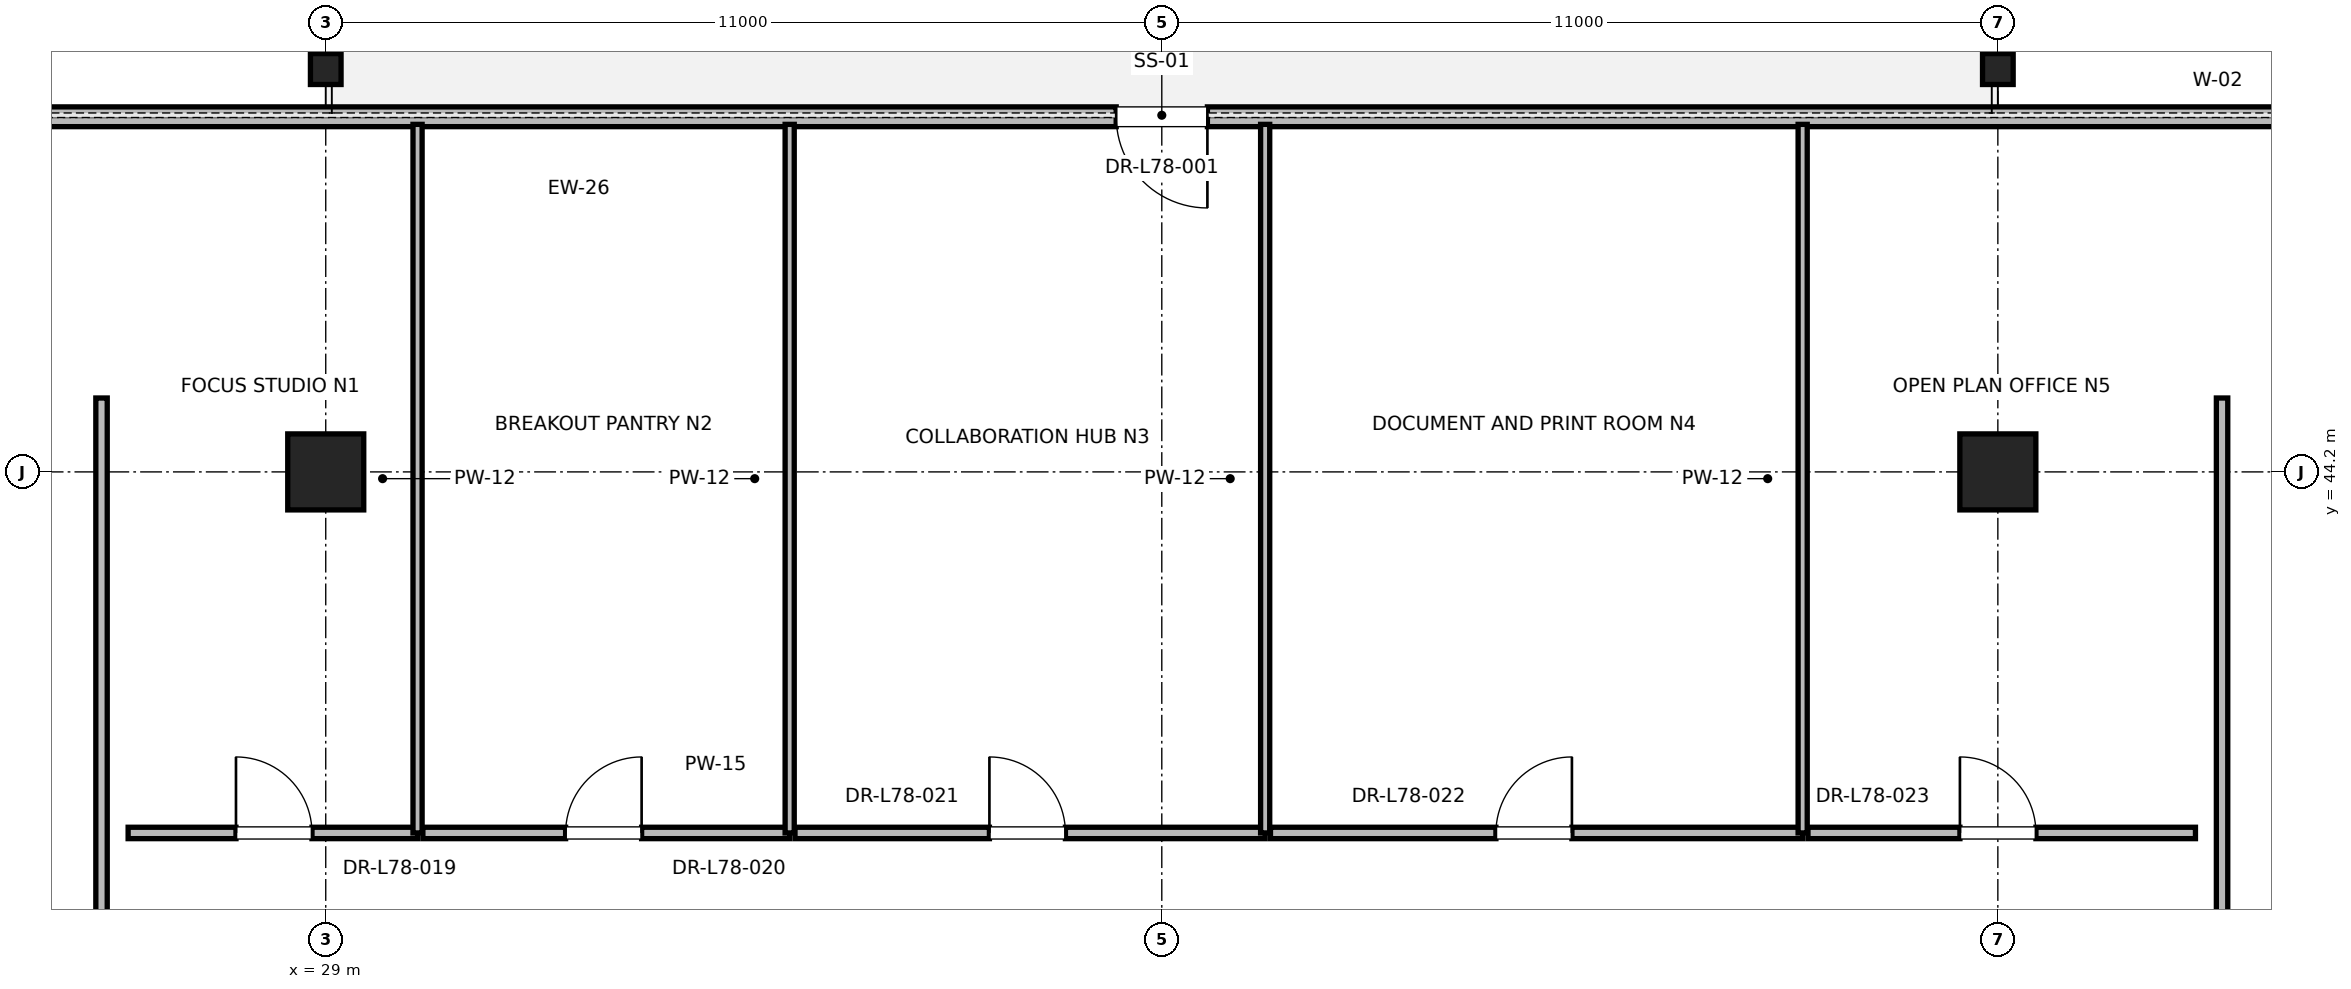
"""IFC4 building model, lengths in metres.
Left out: names, types, materials, properties, quantities, classifications, styles, units other than length and angle.
Written with IfcOpenShell. Run it as: python <this file> out.ifc"""

import sys

from ifc_helpers import new_model, si_unit, direction, frame, frame_2d, origin, origin_2d, place, context, subcontext, project, spatial, rectangle, i_section, extrude, element, fill, save


model = new_model("IFC4")
c1 = context("Model", 3, precision=1e-05, world=origin(), true_north=direction((0.0, 1.0)))
c2 = subcontext(c1, "Body", "Model", "MODEL_VIEW")
j1 = project(units=[si_unit("LENGTHUNIT", "METRE"), si_unit("PLANEANGLEUNIT", "RADIAN")], contexts=[c1])
p1 = place(None, origin())
s1 = spatial("IfcSite", under=j1, at=p1, CompositionType="ELEMENT")
p2 = place(p1, origin())
s2 = spatial("IfcBuilding", under=s1, at=p2, CompositionType="ELEMENT")
p3 = place(p2, frame((0.0, 0.0, 334.8)))
s3 = spatial("IfcBuildingStorey", under=s2, at=p3, CompositionType="ELEMENT", Elevation=334.8)
for number, where, z_axis, x_axis in (
    (1, (29.0, 44.2, 0.0), (0.0, 0.0, 1.0), (1.0, 0.0, 0.0)),
    (2, (51.0, 44.2, 0.0), (0.0, 0.0, 1.0), (1.0, 0.0, 0.0)),
):
    element("IfcColumn", number, at=place(p3, frame(where, z_axis=z_axis, x_axis=x_axis)), inside=s3, PredefinedType="COLUMN", context=c2, shape_type="SweptSolid", body=[
        extrude(rectangle(XDim=1.0, YDim=1.0, at=origin_2d()), origin(), (0.0, 0.0, 1.0), 4.0),
    ])
for number, where, z_axis, x_axis in (
    (3, (29.0, 49.5, 0.0), (0.0, 0.0, 1.0), (1.0, 0.0, 0.0)),
    (4, (51.0, 49.5, 0.0), (0.0, 0.0, 1.0), (1.0, 0.0, 0.0)),
):
    element("IfcColumn", number, at=place(p3, frame(where, z_axis=z_axis, x_axis=x_axis)), inside=s3, PredefinedType="COLUMN", context=c2, shape_type="SweptSolid", body=[
        extrude(i_section(OverallWidth=0.403, OverallDepth=0.406, WebThickness=0.027, FlangeThickness=0.043, FilletRadius=0.015, at=origin_2d()), origin(), (0.0, 0.0, 1.0), 4.0),
    ])
p4 = place(p3, frame((60.544, 48.872, 0.0), z_axis=(0.0, 0.0, 1.0), x_axis=(-1.0, 0.0, 0.0)))
e5 = element("IfcWall", 5, at=p4, inside=s3, PredefinedType="PARAPET", context=c2, shape_type="SweptSolid", body=[
    extrude(rectangle(XDim=41.089, YDim=0.26, at=frame_2d((20.544, 0.0))), origin(), (0.0, 0.0, 1.0), 3.196),
])
p5 = place(p4, frame((4.2, 0.0, 0.85)))
e6 = element("IfcOpeningElement", 6, at=p5, cuts=e5, PredefinedType="OPENING", context=c2, shape_type="SweptSolid", body=[
    extrude(rectangle(XDim=1.6, YDim=2.1, at=frame_2d((0.8, 1.05))), frame((0.0, 0.13, 0.0), z_axis=(0.0, -1.0, 0.0), x_axis=(1.0, 0.0, 0.0)), (0.0, 0.0, 1.0), 0.26),
])
p6 = place(p4, frame((19.944, 0.0, 0.0)))
e7 = element("IfcOpeningElement", 7, at=p6, cuts=e5, PredefinedType="OPENING", context=c2, shape_type="SweptSolid", body=[
    extrude(rectangle(XDim=1.2, YDim=2.2, at=frame_2d((0.6, 1.1))), frame((0.0, 0.13, 0.0), z_axis=(0.0, -1.0, 0.0), x_axis=(1.0, 0.0, 0.0)), (0.0, 0.0, 1.0), 0.26),
])
p7 = place(p4, frame((35.289, 0.0, 0.85)))
e8 = element("IfcOpeningElement", 8, at=p7, cuts=e5, PredefinedType="OPENING", context=c2, shape_type="SweptSolid", body=[
    extrude(rectangle(XDim=1.6, YDim=2.1, at=frame_2d((0.8, 1.05))), frame((0.0, 0.13, 0.0), z_axis=(0.0, -1.0, 0.0), x_axis=(1.0, 0.0, 0.0)), (0.0, 0.0, 1.0), 0.26),
])
p8 = place(p3, frame((26.4, 39.45, 0.0), z_axis=(0.0, 0.0, 1.0), x_axis=(1.0, 0.0, 0.0)))
e9 = element("IfcWall", 9, at=p8, inside=s3, PredefinedType="PARTITIONING", context=c2, shape_type="SweptSolid", body=[
    extrude(rectangle(XDim=3.808, YDim=0.15, at=frame_2d((1.904, 0.0))), origin(), (0.0, 0.0, 1.0), 2.85),
])
p9 = place(p8, frame((1.419, 0.0, 0.0)))
e10 = element("IfcOpeningElement", 10, at=p9, cuts=e9, PredefinedType="OPENING", context=c2, shape_type="SweptSolid", body=[
    extrude(rectangle(XDim=1.0, YDim=2.15, at=frame_2d((0.5, 1.075))), frame((0.0, 0.075, 0.0), z_axis=(0.0, -1.0, 0.0), x_axis=(1.0, 0.0, 0.0)), (0.0, 0.0, 1.0), 0.15),
])
p10 = place(p3, frame((30.208, 39.45, 0.0), z_axis=(0.0, 0.0, 1.0), x_axis=(0.0, 1.0, 0.0)))
e11 = element("IfcWall", 11, at=p10, inside=s3, PredefinedType="PARTITIONING", context=c2, shape_type="SweptSolid", body=[
    extrude(rectangle(XDim=9.322, YDim=0.12, at=frame_2d((4.661, 0.0))), origin(), (0.0, 0.0, 1.0), 2.415),
])
p11 = place(p3, frame((30.278, 39.45, 0.0), z_axis=(0.0, 0.0, 1.0), x_axis=(1.0, 0.0, 0.0)))
e12 = element("IfcWall", 12, at=p11, inside=s3, PredefinedType="PARTITIONING", context=c2, shape_type="SweptSolid", body=[
    extrude(rectangle(XDim=4.826, YDim=0.15, at=frame_2d((2.413, 0.0))), origin(), (0.0, 0.0, 1.0), 2.85),
])
p12 = place(p11, frame((1.878, 0.0, 0.0)))
e13 = element("IfcOpeningElement", 13, at=p12, cuts=e12, PredefinedType="OPENING", context=c2, shape_type="SweptSolid", body=[
    extrude(rectangle(XDim=1.0, YDim=2.15, at=frame_2d((0.5, 1.075))), frame((0.0, 0.075, 0.0), z_axis=(0.0, -1.0, 0.0), x_axis=(1.0, 0.0, 0.0)), (0.0, 0.0, 1.0), 0.15),
])
p13 = place(p3, frame((35.104, 39.45, 0.0), z_axis=(0.0, 0.0, 1.0), x_axis=(0.0, 1.0, 0.0)))
e14 = element("IfcWall", 14, at=p13, inside=s3, PredefinedType="PARTITIONING", context=c2, shape_type="SweptSolid", body=[
    extrude(rectangle(XDim=9.322, YDim=0.12, at=frame_2d((4.661, 0.0))), origin(), (0.0, 0.0, 1.0), 2.415),
])
p14 = place(p3, frame((35.174, 39.45, 0.0), z_axis=(0.0, 0.0, 1.0), x_axis=(1.0, 0.0, 0.0)))
e15 = element("IfcWall", 15, at=p14, inside=s3, PredefinedType="PARTITIONING", context=c2, shape_type="SweptSolid", body=[
    extrude(rectangle(XDim=6.186, YDim=0.15, at=frame_2d((3.093, 0.0))), origin(), (0.0, 0.0, 1.0), 2.85),
])
p15 = place(p14, frame((2.558, 0.0, 0.0)))
e16 = element("IfcOpeningElement", 16, at=p15, cuts=e15, PredefinedType="OPENING", context=c2, shape_type="SweptSolid", body=[
    extrude(rectangle(XDim=1.0, YDim=2.15, at=frame_2d((0.5, 1.075))), frame((0.0, 0.075, 0.0), z_axis=(0.0, -1.0, 0.0), x_axis=(1.0, 0.0, 0.0)), (0.0, 0.0, 1.0), 0.15),
])
p16 = place(p3, frame((41.36, 39.45, 0.0), z_axis=(0.0, 0.0, 1.0), x_axis=(0.0, 1.0, 0.0)))
e17 = element("IfcWall", 17, at=p16, inside=s3, PredefinedType="PARTITIONING", context=c2, shape_type="SweptSolid", body=[
    extrude(rectangle(XDim=9.322, YDim=0.12, at=frame_2d((4.661, 0.0))), origin(), (0.0, 0.0, 1.0), 2.415),
])
p17 = place(p3, frame((41.43, 39.45, 0.0), z_axis=(0.0, 0.0, 1.0), x_axis=(1.0, 0.0, 0.0)))
e18 = element("IfcWall", 18, at=p17, inside=s3, PredefinedType="PARTITIONING", context=c2, shape_type="SweptSolid", body=[
    extrude(rectangle(XDim=7.002, YDim=0.15, at=frame_2d((3.501, 0.0))), origin(), (0.0, 0.0, 1.0), 2.85),
])
p18 = place(p17, frame((2.966, 0.0, 0.0)))
e19 = element("IfcOpeningElement", 19, at=p18, cuts=e18, PredefinedType="OPENING", context=c2, shape_type="SweptSolid", body=[
    extrude(rectangle(XDim=1.0, YDim=2.15, at=frame_2d((0.5, 1.075))), frame((0.0, 0.075, 0.0), z_axis=(0.0, -1.0, 0.0), x_axis=(1.0, 0.0, 0.0)), (0.0, 0.0, 1.0), 0.15),
])
p19 = place(p3, frame((48.432, 39.45, 0.0), z_axis=(0.0, 0.0, 1.0), x_axis=(0.0, 1.0, 0.0)))
e20 = element("IfcWall", 20, at=p19, inside=s3, PredefinedType="PARTITIONING", context=c2, shape_type="SweptSolid", body=[
    extrude(rectangle(XDim=9.322, YDim=0.12, at=frame_2d((4.661, 0.0))), origin(), (0.0, 0.0, 1.0), 2.415),
])
p20 = place(p3, frame((48.502, 39.45, 0.0), z_axis=(0.0, 0.0, 1.0), x_axis=(1.0, 0.0, 0.0)))
e21 = element("IfcWall", 21, at=p20, inside=s3, PredefinedType="PARTITIONING", context=c2, shape_type="SweptSolid", body=[
    extrude(rectangle(XDim=5.098, YDim=0.15, at=frame_2d((2.549, 0.0))), origin(), (0.0, 0.0, 1.0), 2.85),
])
p21 = place(p20, frame((1.999, 0.0, 0.0)))
e22 = element("IfcOpeningElement", 22, at=p21, cuts=e21, PredefinedType="OPENING", context=c2, shape_type="SweptSolid", body=[
    extrude(rectangle(XDim=1.0, YDim=2.15, at=frame_2d((0.5, 1.075))), frame((0.0, 0.075, 0.0), z_axis=(0.0, -1.0, 0.0), x_axis=(1.0, 0.0, 0.0)), (0.0, 0.0, 1.0), 0.15),
])
p22 = place(p3, frame((26.05, 33.225, 0.0), z_axis=(0.0, 0.0, 1.0), x_axis=(0.0, 1.0, 0.0)))
e23 = element("IfcWall", 23, at=p22, inside=s3, PredefinedType="PARTITIONING", context=c2, shape_type="SweptSolid", body=[
    extrude(rectangle(XDim=11.947, YDim=0.15, at=frame_2d((5.974, 0.0))), origin(), (0.0, 0.0, 1.0), 2.85),
])
p23 = place(p22, frame((1.087, 0.0, 0.0)))
e24 = element("IfcOpeningElement", 24, at=p23, cuts=e23, PredefinedType="OPENING", context=c2, shape_type="SweptSolid", body=[
    extrude(rectangle(XDim=1.0, YDim=2.15, at=frame_2d((0.5, 1.075))), frame((0.0, 0.075, 0.0), z_axis=(0.0, -1.0, 0.0), x_axis=(1.0, 0.0, 0.0)), (0.0, 0.0, 1.0), 0.15),
])
p24 = place(p3, frame((53.95, 36.76, 0.0), z_axis=(0.0, 0.0, 1.0), x_axis=(0.0, 1.0, 0.0)))
e25 = element("IfcWall", 25, at=p24, inside=s3, PredefinedType="PARTITIONING", context=c2, shape_type="SweptSolid", body=[
    extrude(rectangle(XDim=8.413, YDim=0.15, at=frame_2d((4.206, 0.0))), origin(), (0.0, 0.0, 1.0), 2.85),
])
p25 = place(p24, frame((0.14, 0.0, 0.0)))
e26 = element("IfcOpeningElement", 26, at=p25, cuts=e25, PredefinedType="OPENING", context=c2, shape_type="SweptSolid", body=[
    extrude(rectangle(XDim=1.5, YDim=2.25, at=frame_2d((0.75, 1.125))), frame((0.0, 0.075, 0.0), z_axis=(0.0, -1.0, 0.0), x_axis=(1.0, 0.0, 0.0)), (0.0, 0.0, 1.0), 0.15),
])
p26 = place(p6, origin())
e27 = element("IfcDoor", 27, at=p26, inside=s3, OperationType="SINGLE_SWING_LEFT", PredefinedType="DOOR", context=c2, shape_type="SweptSolid", body=[
    extrude(rectangle(XDim=1.2, YDim=2.2, at=frame_2d((0.6, 1.1))), frame((0.0, 0.025, 0.0), z_axis=(0.0, -1.0, 0.0), x_axis=(1.0, 0.0, 0.0)), (0.0, 0.0, 1.0), 0.05),
])
fill(e7, e27)
p27 = place(p9, origin())
e28 = element("IfcDoor", 28, at=p27, inside=s3, OperationType="SINGLE_SWING_LEFT", PredefinedType="DOOR", context=c2, shape_type="SweptSolid", body=[
    extrude(rectangle(XDim=1.0, YDim=2.15, at=frame_2d((0.5, 1.075))), frame((0.0, 0.025, 0.0), z_axis=(0.0, -1.0, 0.0), x_axis=(1.0, 0.0, 0.0)), (0.0, 0.0, 1.0), 0.05),
])
fill(e10, e28)
p28 = place(p12, origin())
e29 = element("IfcDoor", 29, at=p28, inside=s3, OperationType="SINGLE_SWING_RIGHT", PredefinedType="DOOR", context=c2, shape_type="SweptSolid", body=[
    extrude(rectangle(XDim=1.0, YDim=2.15, at=frame_2d((0.5, 1.075))), frame((0.0, 0.025, 0.0), z_axis=(0.0, -1.0, 0.0), x_axis=(1.0, 0.0, 0.0)), (0.0, 0.0, 1.0), 0.05),
])
fill(e13, e29)
p29 = place(p15, origin())
e30 = element("IfcDoor", 30, at=p29, inside=s3, OperationType="SINGLE_SWING_LEFT", PredefinedType="DOOR", context=c2, shape_type="SweptSolid", body=[
    extrude(rectangle(XDim=1.0, YDim=2.15, at=frame_2d((0.5, 1.075))), frame((0.0, 0.025, 0.0), z_axis=(0.0, -1.0, 0.0), x_axis=(1.0, 0.0, 0.0)), (0.0, 0.0, 1.0), 0.05),
])
fill(e16, e30)
p30 = place(p18, origin())
e31 = element("IfcDoor", 31, at=p30, inside=s3, OperationType="SINGLE_SWING_RIGHT", PredefinedType="DOOR", context=c2, shape_type="SweptSolid", body=[
    extrude(rectangle(XDim=1.0, YDim=2.15, at=frame_2d((0.5, 1.075))), frame((0.0, 0.025, 0.0), z_axis=(0.0, -1.0, 0.0), x_axis=(1.0, 0.0, 0.0)), (0.0, 0.0, 1.0), 0.05),
])
fill(e19, e31)
p31 = place(p21, origin())
e32 = element("IfcDoor", 32, at=p31, inside=s3, OperationType="SINGLE_SWING_LEFT", PredefinedType="DOOR", context=c2, shape_type="SweptSolid", body=[
    extrude(rectangle(XDim=1.0, YDim=2.15, at=frame_2d((0.5, 1.075))), frame((0.0, 0.025, 0.0), z_axis=(0.0, -1.0, 0.0), x_axis=(1.0, 0.0, 0.0)), (0.0, 0.0, 1.0), 0.05),
])
fill(e22, e32)
save(model, sys.argv[1])
